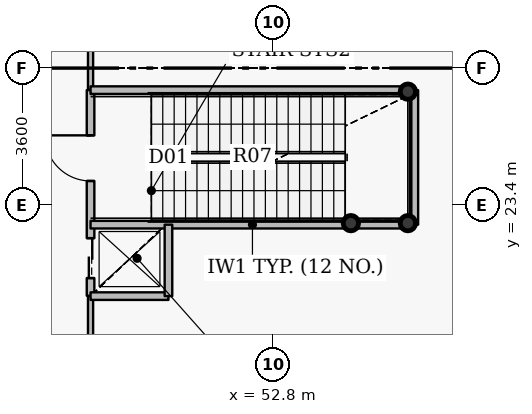
"""IFC4 building model, lengths in metres.
Left out: names, types, materials, properties, quantities, classifications, styles, units other than length and angle.
Written with IfcOpenShell. Run it as: python <this file> out.ifc"""

import sys

from ifc_helpers import new_model, si_unit, direction, frame, frame_2d, origin, origin_2d, place, context, subcontext, project, spatial, rectangle, hollow_circle, extrude, source, transform, mapped, element, fill, save


model = new_model("IFC4")
c1 = context("Model", 3, precision=1e-05, world=origin(), true_north=direction((0.0, 1.0)))
c2 = subcontext(c1, "Body", "Model", "MODEL_VIEW")
j1 = project(units=[si_unit("LENGTHUNIT", "METRE"), si_unit("PLANEANGLEUNIT", "RADIAN")], contexts=[c1])
p1 = place(None, origin())
s1 = spatial("IfcSite", under=j1, at=p1, CompositionType="ELEMENT")
p2 = place(p1, origin())
s2 = spatial("IfcBuilding", under=s1, at=p2, CompositionType="ELEMENT")
p3 = place(p2, frame((0.0, 0.0, 27.0)))
s3 = spatial("IfcBuildingStorey", under=s2, at=p3, CompositionType="ELEMENT", Elevation=27.0)
for number, where, z_axis, x_axis in (
    (1, (56.35, 26.38, 0.0), (0.0, 0.0, 1.0), (1.0, 0.0, 0.0)),
    (2, (56.35, 22.92, 0.0), (0.0, 0.0, 1.0), (1.0, 0.0, 0.0)),
    (3, (54.85, 22.92, 0.0), (0.0, 0.0, 1.0), (1.0, 0.0, 0.0)),
):
    element("IfcColumn", number, at=place(p3, frame(where, z_axis=z_axis, x_axis=x_axis)), inside=s3, PredefinedType="COLUMN", context=c2, shape_type="SweptSolid", body=[
        extrude(hollow_circle(Radius=0.203, WallThickness=0.016, at=origin_2d()), origin(), (0.0, 0.0, 1.0), 5.4),
    ])
p4 = place(p3, frame((48.0, 16.931, 0.0), z_axis=(0.0, 0.0, 1.0), x_axis=(0.0, 1.0, 0.0)))
e4 = element("IfcWall", 4, at=p4, inside=s3, PredefinedType="PARTITIONING", context=c2, shape_type="SweptSolid", body=[
    extrude(rectangle(XDim=4.069, YDim=0.135, at=frame_2d((2.035, 0.0))), origin(), (0.0, 0.0, 1.0), 3.185),
])
p5 = place(p3, frame((48.0, 21.01, 0.0), z_axis=(0.0, 0.0, 1.0), x_axis=(0.0, 1.0, 0.0)))
e5 = element("IfcWall", 5, at=p5, inside=s3, PredefinedType="PARTITIONING", context=c2, shape_type="SweptSolid", body=[
    extrude(rectangle(XDim=5.41, YDim=0.2, at=frame_2d((2.705, 0.0))), origin(), (0.0, 0.0, 1.0), 3.185),
])
p6 = place(p5, frame((3.02, 0.0, 0.0)))
e6 = element("IfcOpeningElement", 6, at=p6, cuts=e5, PredefinedType="OPENING", context=c2, shape_type="SweptSolid", body=[
    extrude(rectangle(XDim=1.2, YDim=2.15, at=origin_2d()), frame((0.6, 0.11, 1.075), z_axis=(0.0, -1.0, 0.0), x_axis=(1.0, 0.0, 0.0)), (0.0, 0.0, 1.0), 0.22),
])
p7 = place(p5, frame((0.465, 0.0, 0.0)))
e7 = element("IfcOpeningElement", 7, at=p7, cuts=e5, PredefinedType="OPENING", context=c2, shape_type="SweptSolid", body=[
    extrude(rectangle(XDim=1.05, YDim=2.15, at=origin_2d()), frame((0.525, 0.11, 1.075), z_axis=(0.0, -1.0, 0.0), x_axis=(1.0, 0.0, 0.0)), (0.0, 0.0, 1.0), 0.22),
])
p8 = place(p3, frame((48.0, 21.0, 0.0), z_axis=(0.0, 0.0, 1.0), x_axis=(1.0, 0.0, 0.0)))
e8 = element("IfcWall", 8, at=p8, inside=s3, PredefinedType="PARTITIONING", context=c2, shape_type="SweptSolid", body=[
    extrude(rectangle(XDim=2.05, YDim=0.2, at=frame_2d((1.025, 0.0))), origin(), (0.0, 0.0, 1.0), 5.15),
])
p9 = place(p3, frame((48.0, 22.88, 0.0), z_axis=(0.0, 0.0, 1.0), x_axis=(1.0, 0.0, 0.0)))
e9 = element("IfcWall", 9, at=p9, inside=s3, PredefinedType="PARTITIONING", context=c2, shape_type="SweptSolid", body=[
    extrude(rectangle(XDim=8.52, YDim=0.2, at=frame_2d((4.26, 0.0))), origin(), (0.0, 0.0, 1.0), 5.15),
])
p10 = place(p3, frame((48.0, 26.43, 0.0), z_axis=(0.0, 0.0, 1.0), x_axis=(0.0, 1.0, 0.0)))
e10 = element("IfcWall", 10, at=p10, inside=s3, PredefinedType="PARTITIONING", context=c2, shape_type="SweptSolid", body=[
    extrude(rectangle(XDim=14.556, YDim=0.135, at=frame_2d((7.278, 0.0))), origin(), (0.0, 0.0, 1.0), 3.185),
])
p11 = place(p10, frame((6.753, 0.0, 0.0)))
e11 = element("IfcOpeningElement", 11, at=p11, cuts=e10, PredefinedType="OPENING", context=c2, shape_type="SweptSolid", body=[
    extrude(rectangle(XDim=1.05, YDim=2.15, at=origin_2d()), frame((0.525, 0.078, 1.075), z_axis=(0.0, -1.0, 0.0), x_axis=(1.0, 0.0, 0.0)), (0.0, 0.0, 1.0), 0.155),
])
p12 = place(p3, frame((48.0, 26.42, 0.0), z_axis=(0.0, 0.0, 1.0), x_axis=(1.0, 0.0, 0.0)))
e12 = element("IfcWall", 12, at=p12, inside=s3, PredefinedType="PARTITIONING", context=c2, shape_type="SweptSolid", body=[
    extrude(rectangle(XDim=8.52, YDim=0.2, at=frame_2d((4.26, 0.0))), origin(), (0.0, 0.0, 1.0), 5.15),
])
p13 = place(p3, frame((50.05, 21.0, 0.0), z_axis=(0.0, 0.0, 1.0), x_axis=(0.0, 1.0, 0.0)))
e13 = element("IfcWall", 13, at=p13, inside=s3, PredefinedType="PARTITIONING", context=c2, shape_type="SweptSolid", body=[
    extrude(rectangle(XDim=1.88, YDim=0.2, at=frame_2d((0.94, 0.0))), origin(), (0.0, 0.0, 1.0), 3.185),
])
p14 = place(p3, frame((56.52, 22.88, 0.0), z_axis=(0.0, 0.0, 1.0), x_axis=(0.0, 1.0, 0.0)))
e14 = element("IfcWall", 14, at=p14, inside=s3, PredefinedType="PARTITIONING", context=c2, shape_type="SweptSolid", body=[
    extrude(rectangle(XDim=3.54, YDim=0.2, at=frame_2d((1.77, 0.0))), origin(), (0.0, 0.0, 1.0), 5.15),
])
m1 = source(origin(), c2, "Body", "SweptSolid", [
    extrude(rectangle(XDim=1.2, YDim=2.15, at=origin_2d()), frame((0.6, 0.025, 1.075), z_axis=(0.0, -1.0, 0.0), x_axis=(1.0, 0.0, 0.0)), (0.0, 0.0, 1.0), 0.05),
])
p15 = place(p6, origin())
e15 = element("IfcDoor", 15, at=p15, inside=s3, OperationType="SINGLE_SWING_RIGHT", PredefinedType="DOOR", context=c2, shape_type="MappedRepresentation", body=[
    mapped(m1, transform((0.0, 0.0, 0.0), x_axis=(1.0, 0.0, 0.0), y_axis=(0.0, 1.0, 0.0), z_axis=(0.0, 0.0, 1.0), scale=1.0)),
])
fill(e6, e15)
m2 = source(origin(), c2, "Body", "SweptSolid", [
    extrude(rectangle(XDim=1.05, YDim=2.15, at=origin_2d()), frame((0.525, 0.025, 1.075), z_axis=(0.0, -1.0, 0.0), x_axis=(1.0, 0.0, 0.0)), (0.0, 0.0, 1.0), 0.05),
])
p16 = place(p7, origin())
e16 = element("IfcDoor", 16, at=p16, inside=s3, OperationType="DOUBLE_DOOR_SLIDING", PredefinedType="USERDEFINED", context=c2, shape_type="MappedRepresentation", body=[
    mapped(m2, transform((0.0, 0.0, 0.0), x_axis=(1.0, 0.0, 0.0), y_axis=(0.0, 1.0, 0.0), z_axis=(0.0, 0.0, 1.0), scale=1.0)),
])
fill(e7, e16)
save(model, sys.argv[1])
